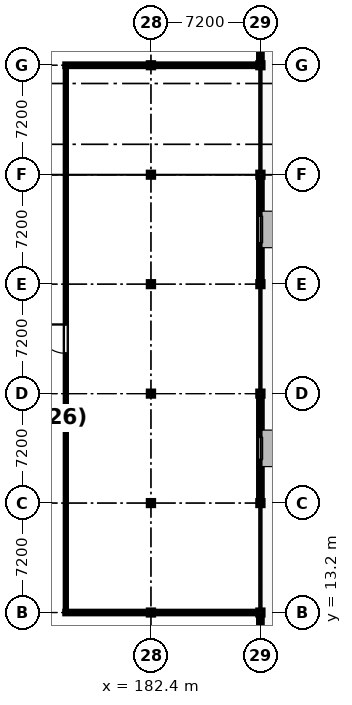
"""IFC4 building model, lengths in metres.
Left out: names, types, materials, properties, quantities, classifications, styles, units other than length and angle.
Written with IfcOpenShell. Run it as: python <this file> out.ifc"""

import sys

from ifc_helpers import new_model, si_unit, direction, frame, frame_2d, origin, origin_2d, place, context, subcontext, project, spatial, rectangle, i_section, extrude, element, fill, save


model = new_model("IFC4")
c1 = context("Model", 3, precision=1e-05, world=origin(), true_north=direction((0.0, 1.0)))
c2 = subcontext(c1, "Body", "Model", "MODEL_VIEW")
j1 = project(units=[si_unit("LENGTHUNIT", "METRE"), si_unit("PLANEANGLEUNIT", "RADIAN")], contexts=[c1])
p1 = place(None, origin())
s1 = spatial("IfcSite", under=j1, at=p1, CompositionType="ELEMENT")
p2 = place(p1, origin())
s2 = spatial("IfcBuilding", under=s1, at=p2, CompositionType="ELEMENT")
p3 = place(p2, frame((0.0, 0.0, 9.3)))
s3 = spatial("IfcBuildingStorey", under=s2, at=p3, CompositionType="ELEMENT", Elevation=9.3)
for number, where, z_axis, x_axis in (
    (1, (182.4, 13.2, 0.0), (0.0, 0.0, 1.0), (1.0, 0.0, 0.0)),
    (2, (182.4, 20.4, 0.0), (0.0, 0.0, 1.0), (1.0, 0.0, 0.0)),
    (3, (182.4, 27.6, 0.0), (0.0, 0.0, 1.0), (1.0, 0.0, 0.0)),
    (4, (182.4, 34.8, 0.0), (0.0, 0.0, 1.0), (1.0, 0.0, 0.0)),
    (5, (182.4, 42.0, 0.0), (0.0, 0.0, 1.0), (1.0, 0.0, 0.0)),
    (6, (182.4, 49.2, 0.0), (0.0, 0.0, 1.0), (1.0, 0.0, 0.0)),
    (7, (189.6, 13.2, 0.0), (0.0, 0.0, 1.0), (1.0, 0.0, 0.0)),
    (8, (189.6, 20.4, 0.0), (0.0, 0.0, 1.0), (1.0, 0.0, 0.0)),
    (9, (189.6, 27.6, 0.0), (0.0, 0.0, 1.0), (1.0, 0.0, 0.0)),
    (10, (189.6, 34.8, 0.0), (0.0, 0.0, 1.0), (1.0, 0.0, 0.0)),
    (11, (189.6, 42.0, 0.0), (0.0, 0.0, 1.0), (1.0, 0.0, 0.0)),
    (12, (189.6, 49.2, 0.0), (0.0, 0.0, 1.0), (1.0, 0.0, 0.0)),
):
    element("IfcColumn", number, at=place(p3, frame(where, z_axis=z_axis, x_axis=x_axis)), inside=s3, PredefinedType="COLUMN", context=c2, shape_type="SweptSolid", body=[
        extrude(i_section(OverallWidth=0.368, OverallDepth=0.356, WebThickness=0.011, FlangeThickness=0.018, FilletRadius=0.015, at=origin_2d()), origin(), (0.0, 0.0, 1.0), 3.9),
    ])
p4 = place(p3, frame((189.6, 13.02, 0.0), z_axis=(0.0, 0.0, 1.0), x_axis=(0.0, -1.0, 0.0)))
e13 = element("IfcWall", 13, at=p4, inside=s3, PredefinedType="STANDARD", context=c2, shape_type="SweptSolid", body=[
    extrude(rectangle(XDim=6.84, YDim=0.26, at=frame_2d((3.42, 0.0))), origin(), (0.0, 0.0, 1.0), 2.828),
])
p5 = place(p4, frame((2.37, 0.0, 0.9)))
e14 = element("IfcOpeningElement", 14, at=p5, cuts=e13, PredefinedType="OPENING", context=c2, shape_type="SweptSolid", body=[
    extrude(rectangle(XDim=2.1, YDim=1.5, at=frame_2d((1.05, 0.75))), frame((0.0, 0.14, 0.0), z_axis=(0.0, -1.0, 0.0), x_axis=(1.0, 0.0, 0.0)), (0.0, 0.0, 1.0), 0.28),
])
p6 = place(p3, frame((189.6, 27.42, 0.0), z_axis=(0.0, 0.0, 1.0), x_axis=(0.0, -1.0, 0.0)))
e15 = element("IfcWall", 15, at=p6, inside=s3, PredefinedType="STANDARD", context=c2, shape_type="SweptSolid", body=[
    extrude(rectangle(XDim=6.84, YDim=0.26, at=frame_2d((3.42, 0.0))), origin(), (0.0, 0.0, 1.0), 2.828),
])
p7 = place(p6, frame((2.67, 0.0, 0.9)))
e16 = element("IfcOpeningElement", 16, at=p7, cuts=e15, PredefinedType="OPENING", context=c2, shape_type="SweptSolid", body=[
    extrude(rectangle(XDim=1.5, YDim=1.5, at=frame_2d((0.75, 0.75))), frame((0.0, 0.14, 0.0), z_axis=(0.0, -1.0, 0.0), x_axis=(1.0, 0.0, 0.0)), (0.0, 0.0, 1.0), 0.28),
])
p8 = place(p3, frame((189.6, 41.82, 0.0), z_axis=(0.0, 0.0, 1.0), x_axis=(0.0, -1.0, 0.0)))
e17 = element("IfcWall", 17, at=p8, inside=s3, PredefinedType="STANDARD", context=c2, shape_type="SweptSolid", body=[
    extrude(rectangle(XDim=6.84, YDim=0.26, at=frame_2d((3.42, 0.0))), origin(), (0.0, 0.0, 1.0), 2.828),
])
p9 = place(p8, frame((2.52, 0.0, 0.9)))
e18 = element("IfcOpeningElement", 18, at=p9, cuts=e17, PredefinedType="OPENING", context=c2, shape_type="SweptSolid", body=[
    extrude(rectangle(XDim=1.8, YDim=1.5, at=frame_2d((0.9, 0.75))), frame((0.0, 0.14, 0.0), z_axis=(0.0, -1.0, 0.0), x_axis=(1.0, 0.0, 0.0)), (0.0, 0.0, 1.0), 0.28),
])
p10 = place(p3, frame((189.6, 59.82, 0.0), z_axis=(0.0, 0.0, 1.0), x_axis=(0.0, -1.0, 0.0)))
e19 = element("IfcWall", 19, at=p10, inside=s3, PredefinedType="STANDARD", context=c2, shape_type="SweptSolid", body=[
    extrude(rectangle(XDim=10.44, YDim=0.26, at=frame_2d((5.22, 0.0))), origin(), (0.0, 0.0, 1.0), 2.828),
])
p11 = place(p10, frame((4.17, 0.0, 0.9)))
e20 = element("IfcOpeningElement", 20, at=p11, cuts=e19, PredefinedType="OPENING", context=c2, shape_type="SweptSolid", body=[
    extrude(rectangle(XDim=2.1, YDim=1.5, at=frame_2d((1.05, 0.75))), frame((0.0, 0.14, 0.0), z_axis=(0.0, -1.0, 0.0), x_axis=(1.0, 0.0, 0.0)), (0.0, 0.0, 1.0), 0.28),
])
p12 = place(p3, frame((189.468, 13.2, 0.0), z_axis=(0.0, 0.0, 1.0), x_axis=(-1.0, 0.0, 0.0)))
e21 = element("IfcWall", 21, at=p12, inside=s3, PredefinedType="PARTITIONING", context=c2, shape_type="SweptSolid", body=[
    extrude(rectangle(XDim=12.748, YDim=0.192, at=frame_2d((6.374, 0.0))), origin(), (0.0, 0.0, 1.0), 2.823),
])
p13 = place(p3, frame((176.72, 49.2, 0.0), z_axis=(0.0, 0.0, 1.0), x_axis=(1.0, 0.0, 0.0)))
e22 = element("IfcWall", 22, at=p13, inside=s3, PredefinedType="PARTITIONING", context=c2, shape_type="SweptSolid", body=[
    extrude(rectangle(XDim=12.748, YDim=0.198, at=frame_2d((6.374, 0.0))), origin(), (0.0, 0.0, 1.0), 2.823),
])
p14 = place(p3, frame((176.8, 13.298, 0.0), z_axis=(0.0, 0.0, 1.0), x_axis=(0.0, 1.0, 0.0)))
e23 = element("IfcWall", 23, at=p14, inside=s3, PredefinedType="PARTITIONING", context=c2, shape_type="SweptSolid", body=[
    extrude(rectangle(XDim=35.801, YDim=0.1, at=frame_2d((17.9, 0.0))), origin(), (0.0, 0.0, 1.0), 2.823),
])
p15 = place(p14, frame((16.95, 0.0, 0.0)))
e24 = element("IfcOpeningElement", 24, at=p15, cuts=e23, PredefinedType="OPENING", context=c2, shape_type="SweptSolid", body=[
    extrude(rectangle(XDim=1.9, YDim=2.34, at=frame_2d((0.95, 1.17))), frame((0.0, 0.06, 0.0), z_axis=(0.0, -1.0, 0.0), x_axis=(1.0, 0.0, 0.0)), (0.0, 0.0, 1.0), 0.12),
])
p16 = place(p14, frame((20.1, 0.0, 0.95)))
e25 = element("IfcOpeningElement", 25, at=p16, cuts=e23, PredefinedType="OPENING", context=c2, shape_type="SweptSolid", body=[
    extrude(rectangle(XDim=1.2, YDim=1.0, at=frame_2d((0.6, 0.5))), frame((0.0, 0.06, 0.0), z_axis=(0.0, -1.0, 0.0), x_axis=(1.0, 0.0, 0.0)), (0.0, 0.0, 1.0), 0.12),
])
p17 = place(p7, origin())
e26 = element("IfcWindow", 26, at=p17, inside=s3, PartitioningType="SINGLE_PANEL", PredefinedType="WINDOW", context=c2, shape_type="SweptSolid", body=[
    extrude(rectangle(XDim=1.5, YDim=1.5, at=frame_2d((0.75, 0.75))), frame((0.0, 0.03, 0.0), z_axis=(0.0, -1.0, 0.0), x_axis=(1.0, 0.0, 0.0)), (0.0, 0.0, 1.0), 0.06),
])
fill(e16, e26)
p18 = place(p9, origin())
e27 = element("IfcWindow", 27, at=p18, inside=s3, PartitioningType="SINGLE_PANEL", PredefinedType="WINDOW", context=c2, shape_type="SweptSolid", body=[
    extrude(rectangle(XDim=1.8, YDim=1.5, at=frame_2d((0.9, 0.75))), frame((0.0, 0.03, 0.0), z_axis=(0.0, -1.0, 0.0), x_axis=(1.0, 0.0, 0.0)), (0.0, 0.0, 1.0), 0.06),
])
fill(e18, e27)
p19 = place(p15, origin())
e28 = element("IfcDoor", 28, at=p19, inside=s3, OperationType="SINGLE_SWING_RIGHT", PredefinedType="DOOR", context=c2, shape_type="SweptSolid", body=[
    extrude(rectangle(XDim=1.9, YDim=2.34, at=frame_2d((0.95, 1.17))), frame((0.0, 0.025, 0.0), z_axis=(0.0, -1.0, 0.0), x_axis=(1.0, 0.0, 0.0)), (0.0, 0.0, 1.0), 0.05),
])
fill(e24, e28)
p20 = place(p16, origin())
e29 = element("IfcWindow", 29, at=p20, inside=s3, PartitioningType="SINGLE_PANEL", PredefinedType="WINDOW", context=c2, shape_type="SweptSolid", body=[
    extrude(rectangle(XDim=1.2, YDim=1.0, at=frame_2d((0.6, 0.5))), frame((0.0, 0.03, 0.0), z_axis=(0.0, -1.0, 0.0), x_axis=(1.0, 0.0, 0.0)), (0.0, 0.0, 1.0), 0.06),
])
fill(e25, e29)
save(model, sys.argv[1])
